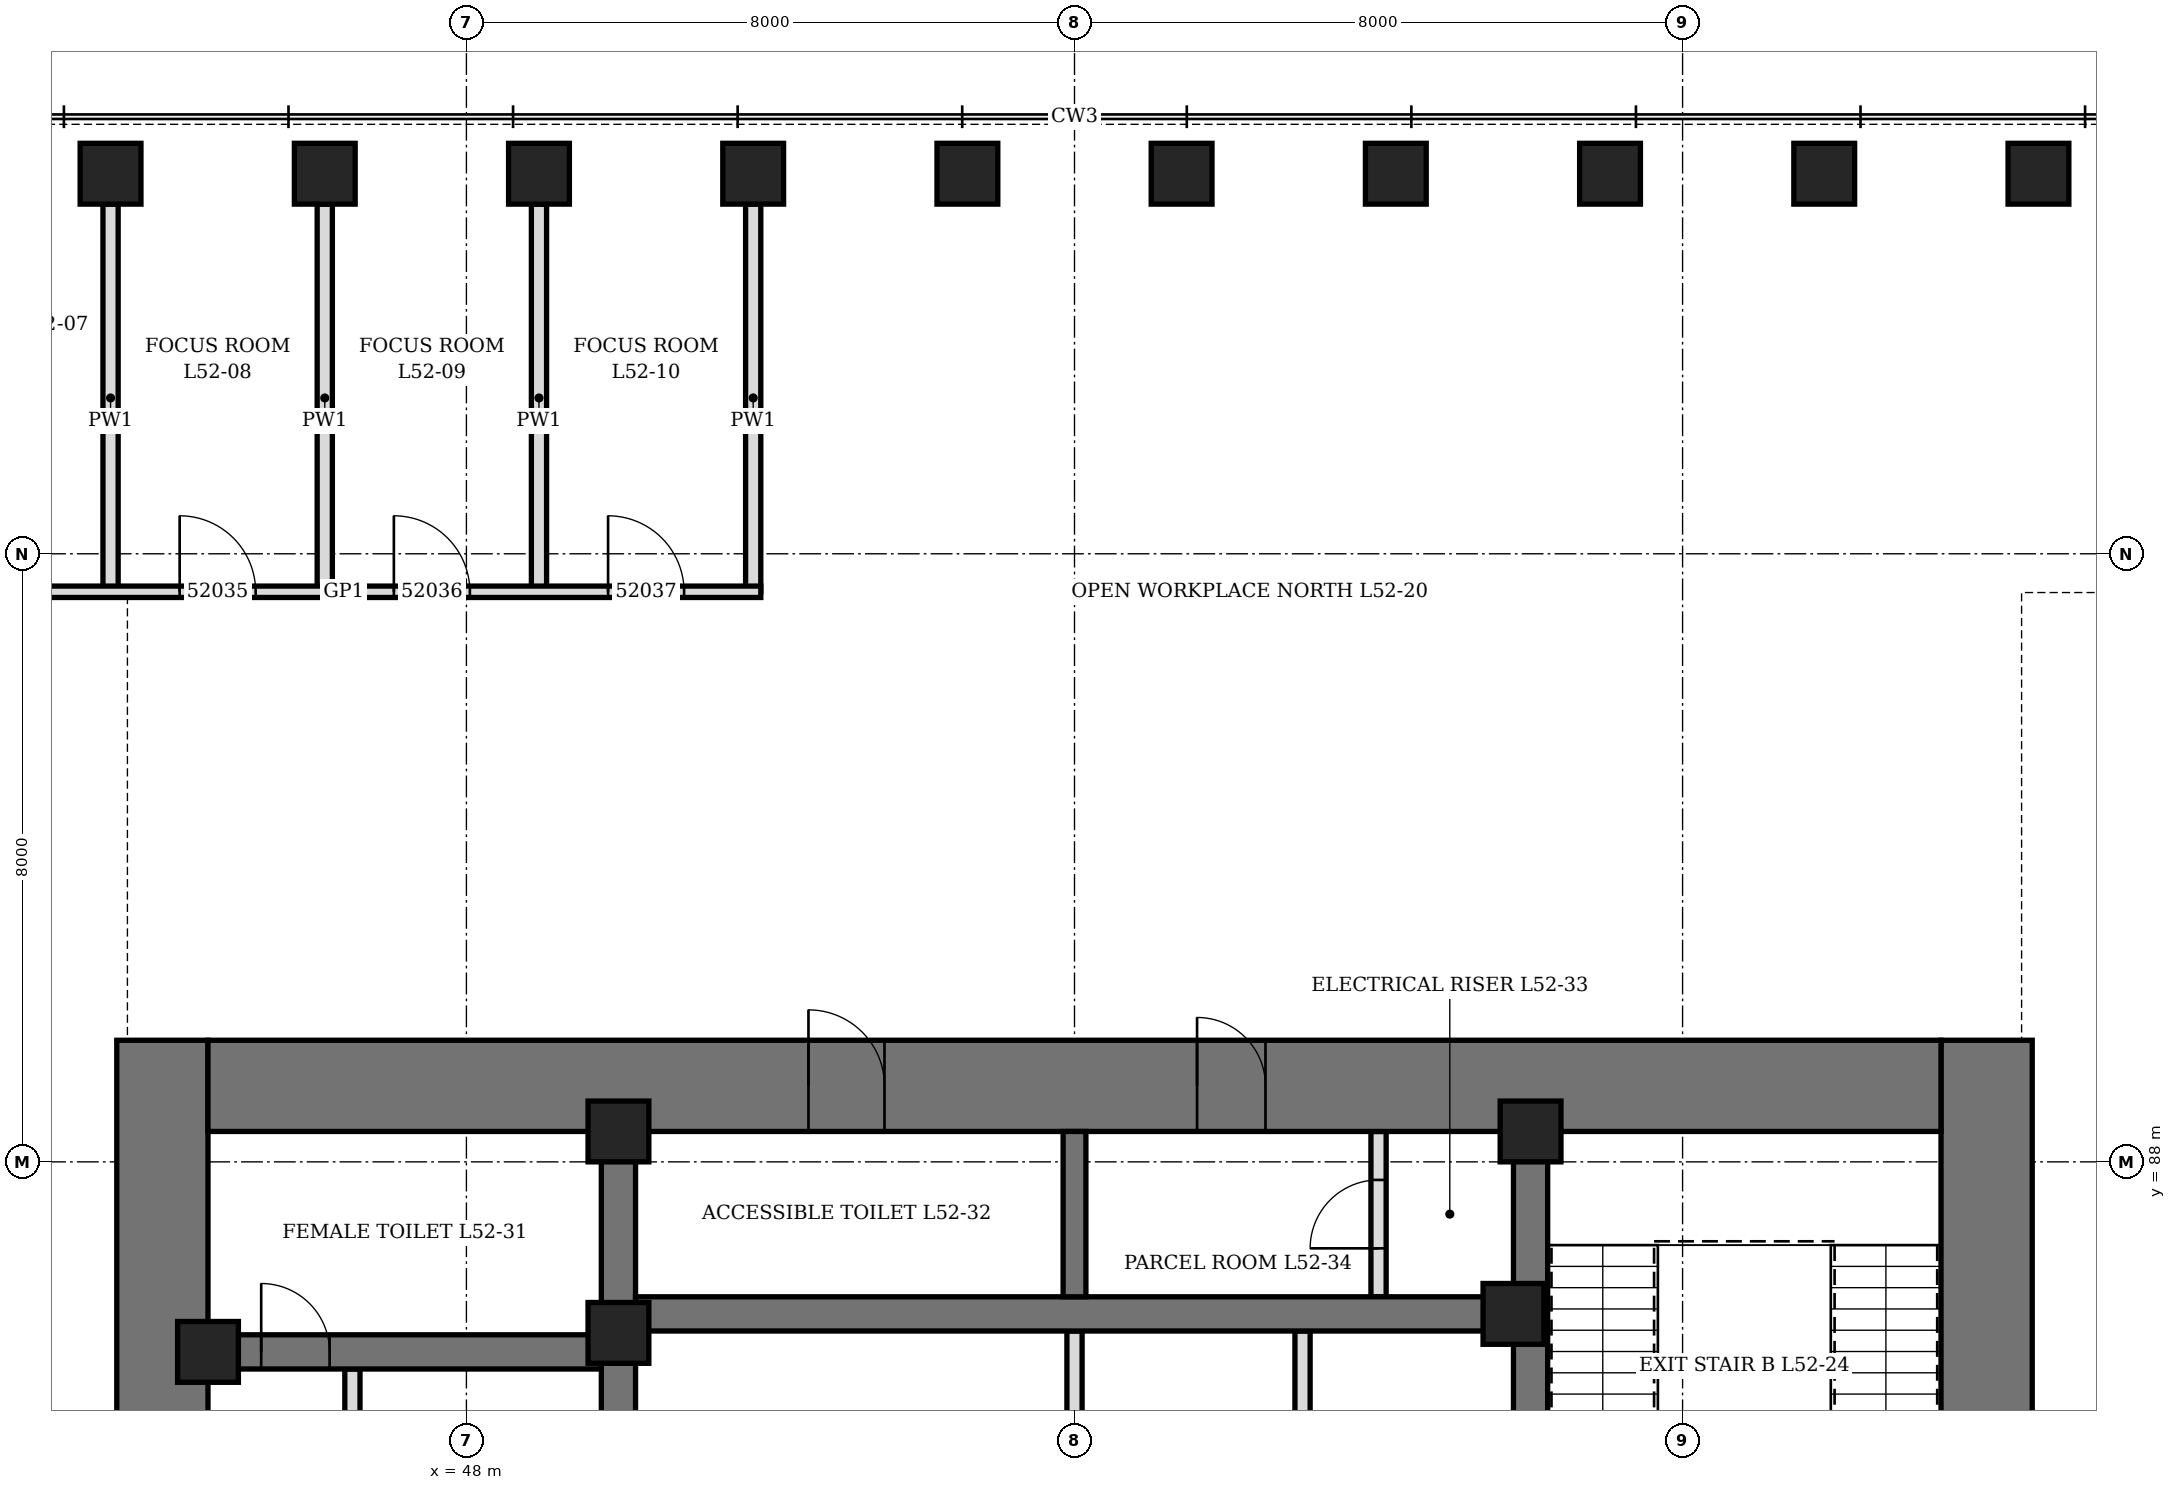
"""IFC4 building model, lengths in metres.
Left out: names, types, materials, properties, quantities, classifications, styles, units other than length and angle.
Written with IfcOpenShell. Run it as: python <this file> out.ifc"""

import sys

from ifc_helpers import new_model, si_unit, direction, frame, frame_2d, origin, origin_2d, place, context, subcontext, project, spatial, rectangle, hollow_rectangle, extrude, element, fill, save


model = new_model("IFC4")
c1 = context("Model", 3, precision=1e-05, world=origin(), true_north=direction((0.0, 1.0)))
c2 = subcontext(c1, "Body", "Model", "MODEL_VIEW")
j1 = project(units=[si_unit("LENGTHUNIT", "METRE"), si_unit("PLANEANGLEUNIT", "RADIAN")], contexts=[c1])
p1 = place(None, origin())
s1 = spatial("IfcSite", under=j1, at=p1, CompositionType="ELEMENT")
p2 = place(p1, origin())
s2 = spatial("IfcBuilding", under=s1, at=p2, CompositionType="ELEMENT")
p3 = place(p2, frame((0.0, 0.0, 231.7)))
s3 = spatial("IfcBuildingStorey", under=s2, at=p3, CompositionType="ELEMENT", Elevation=231.7)
for number, where, z_axis, x_axis in (
    (1, (68.682, 101.0, 0.0), (0.0, 0.0, 1.0), (1.0, 0.0, 0.0)),
    (2, (65.864, 101.0, 0.0), (0.0, 0.0, 1.0), (1.0, 0.0, 0.0)),
    (3, (63.045, 101.0, 0.0), (0.0, 0.0, 1.0), (1.0, 0.0, 0.0)),
    (4, (60.227, 101.0, 0.0), (0.0, 0.0, 1.0), (1.0, 0.0, 0.0)),
    (5, (57.409, 101.0, 0.0), (0.0, 0.0, 1.0), (1.0, 0.0, 0.0)),
    (6, (54.591, 101.0, 0.0), (0.0, 0.0, 1.0), (1.0, 0.0, 0.0)),
    (7, (51.773, 101.0, 0.0), (0.0, 0.0, 1.0), (1.0, 0.0, 0.0)),
    (8, (48.955, 101.0, 0.0), (0.0, 0.0, 1.0), (1.0, 0.0, 0.0)),
    (9, (46.136, 101.0, 0.0), (0.0, 0.0, 1.0), (1.0, 0.0, 0.0)),
    (10, (43.318, 101.0, 0.0), (0.0, 0.0, 1.0), (1.0, 0.0, 0.0)),
):
    element("IfcColumn", number, at=place(p3, frame(where, z_axis=z_axis, x_axis=x_axis)), inside=s3, PredefinedType="COLUMN", context=c2, shape_type="SweptSolid", body=[
        extrude(hollow_rectangle(XDim=0.8, YDim=0.8, WallThickness=0.08, at=origin_2d()), origin(), (0.0, 0.0, 1.0), 4.2),
    ])
p4 = place(p3, frame((44.0, 70.4, 0.0), z_axis=(0.0, 0.0, 1.0), x_axis=(0.0, 1.0, 0.0)))
e11 = element("IfcWall", 11, at=p4, inside=s3, PredefinedType="SHEAR", context=c2, shape_type="SweptSolid", body=[
    extrude(rectangle(XDim=19.2, YDim=1.2, at=frame_2d((9.6, 0.0))), origin(), (0.0, 0.0, 1.0), 4.2),
])
p5 = place(p4, frame((8.6, 0.0, 0.0)))
e12 = element("IfcOpeningElement", 12, at=p5, cuts=e11, PredefinedType="OPENING", context=c2, shape_type="SweptSolid", body=[
    extrude(rectangle(XDim=2.0, YDim=2.4, at=frame_2d((1.0, 1.2))), frame((0.0, 0.61, 0.0), z_axis=(0.0, -1.0, 0.0), x_axis=(1.0, 0.0, 0.0)), (0.0, 0.0, 1.0), 1.22),
])
p6 = place(p3, frame((68.0, 70.4, 0.0), z_axis=(0.0, 0.0, 1.0), x_axis=(0.0, 1.0, 0.0)))
e13 = element("IfcWall", 13, at=p6, inside=s3, PredefinedType="SHEAR", context=c2, shape_type="SweptSolid", body=[
    extrude(rectangle(XDim=19.2, YDim=1.2, at=frame_2d((9.6, 0.0))), origin(), (0.0, 0.0, 1.0), 4.2),
])
p7 = place(p6, frame((8.6, 0.0, 0.0)))
e14 = element("IfcOpeningElement", 14, at=p7, cuts=e13, PredefinedType="OPENING", context=c2, shape_type="SweptSolid", body=[
    extrude(rectangle(XDim=2.0, YDim=2.4, at=frame_2d((1.0, 1.2))), frame((0.0, 0.61, 0.0), z_axis=(0.0, -1.0, 0.0), x_axis=(1.0, 0.0, 0.0)), (0.0, 0.0, 1.0), 1.22),
])
p8 = place(p3, frame((44.6, 89.0, 0.0), z_axis=(0.0, 0.0, 1.0), x_axis=(1.0, 0.0, 0.0)))
e15 = element("IfcWall", 15, at=p8, inside=s3, PredefinedType="SHEAR", context=c2, shape_type="SweptSolid", body=[
    extrude(rectangle(XDim=22.8, YDim=1.2, at=frame_2d((11.4, 0.0))), origin(), (0.0, 0.0, 1.0), 4.2),
])
p9 = place(p8, frame((7.9, 0.0, 0.0)))
e16 = element("IfcOpeningElement", 16, at=p9, cuts=e15, PredefinedType="OPENING", context=c2, shape_type="SweptSolid", body=[
    extrude(rectangle(XDim=1.0, YDim=2.1, at=frame_2d((0.5, 1.05))), frame((0.0, 0.61, 0.0), z_axis=(0.0, -1.0, 0.0), x_axis=(1.0, 0.0, 0.0)), (0.0, 0.0, 1.0), 1.22),
])
p10 = place(p8, frame((13.012, 0.0, 0.0)))
e17 = element("IfcOpeningElement", 17, at=p10, cuts=e15, PredefinedType="OPENING", context=c2, shape_type="SweptSolid", body=[
    extrude(rectangle(XDim=0.9, YDim=2.1, at=frame_2d((0.45, 1.05))), frame((0.0, 0.61, 0.0), z_axis=(0.0, -1.0, 0.0), x_axis=(1.0, 0.0, 0.0)), (0.0, 0.0, 1.0), 1.22),
])
p11 = place(p3, frame((50.0, 71.6, 0.0), z_axis=(0.0, 0.0, 1.0), x_axis=(0.0, 1.0, 0.0)))
e18 = element("IfcWall", 18, at=p11, inside=s3, PredefinedType="SHEAR", context=c2, shape_type="SweptSolid", body=[
    extrude(rectangle(XDim=16.8, YDim=0.45, at=frame_2d((8.4, 0.0))), origin(), (0.0, 0.0, 1.0), 4.2),
])
p12 = place(p11, frame((7.5, 0.0, 0.0)))
e19 = element("IfcOpeningElement", 19, at=p12, cuts=e18, PredefinedType="OPENING", context=c2, shape_type="SweptSolid", body=[
    extrude(rectangle(XDim=1.8, YDim=2.4, at=frame_2d((0.9, 1.2))), frame((0.0, 0.235, 0.0), z_axis=(0.0, -1.0, 0.0), x_axis=(1.0, 0.0, 0.0)), (0.0, 0.0, 1.0), 0.47),
])
p13 = place(p3, frame((62.0, 71.6, 0.0), z_axis=(0.0, 0.0, 1.0), x_axis=(0.0, 1.0, 0.0)))
e20 = element("IfcWall", 20, at=p13, inside=s3, PredefinedType="SHEAR", context=c2, shape_type="SweptSolid", body=[
    extrude(rectangle(XDim=16.8, YDim=0.45, at=frame_2d((8.4, 0.0))), origin(), (0.0, 0.0, 1.0), 4.2),
])
p14 = place(p13, frame((7.5, 0.0, 0.0)))
e21 = element("IfcOpeningElement", 21, at=p14, cuts=e20, PredefinedType="OPENING", context=c2, shape_type="SweptSolid", body=[
    extrude(rectangle(XDim=1.8, YDim=2.4, at=frame_2d((0.9, 1.2))), frame((0.0, 0.235, 0.0), z_axis=(0.0, -1.0, 0.0), x_axis=(1.0, 0.0, 0.0)), (0.0, 0.0, 1.0), 0.47),
])
p15 = place(p3, frame((44.6, 85.5, 0.0), z_axis=(0.0, 0.0, 1.0), x_axis=(1.0, 0.0, 0.0)))
e22 = element("IfcWall", 22, at=p15, inside=s3, PredefinedType="SHEAR", context=c2, shape_type="SweptSolid", body=[
    extrude(rectangle(XDim=5.175, YDim=0.45, at=frame_2d((2.587, 0.0))), origin(), (0.0, 0.0, 1.0), 4.2),
])
p16 = place(p15, frame((0.7, 0.0, 0.0)))
e23 = element("IfcOpeningElement", 23, at=p16, cuts=e22, PredefinedType="OPENING", context=c2, shape_type="SweptSolid", body=[
    extrude(rectangle(XDim=0.9, YDim=2.1, at=frame_2d((0.45, 1.05))), frame((0.0, 0.235, 0.0), z_axis=(0.0, -1.0, 0.0), x_axis=(1.0, 0.0, 0.0)), (0.0, 0.0, 1.0), 0.47),
])
p17 = place(p3, frame((50.225, 86.0, 0.0), z_axis=(0.0, 0.0, 1.0), x_axis=(1.0, 0.0, 0.0)))
e24 = element("IfcWall", 24, at=p17, inside=s3, PredefinedType="SHEAR", context=c2, shape_type="SweptSolid", body=[
    extrude(rectangle(XDim=11.55, YDim=0.45, at=frame_2d((5.775, 0.0))), origin(), (0.0, 0.0, 1.0), 4.2),
])
p18 = place(p3, frame((56.0, 86.225, 0.0), z_axis=(0.0, 0.0, 1.0), x_axis=(0.0, 1.0, 0.0)))
e25 = element("IfcWall", 25, at=p18, inside=s3, PredefinedType="SHEAR", context=c2, shape_type="SweptSolid", body=[
    extrude(rectangle(XDim=2.175, YDim=0.3, at=frame_2d((1.087, 0.0))), origin(), (0.0, 0.0, 1.0), 4.2),
])
for number, where, z_axis, x_axis in (
    (26, (44.6, 85.5, 0.0), (0.0, 0.0, 1.0), (1.0, 0.0, 0.0)),
    (27, (50.0, 85.75, 0.0), (0.0, 0.0, 1.0), (1.0, 0.0, 0.0)),
    (28, (50.0, 88.4, 0.0), (0.0, 0.0, 1.0), (1.0, 0.0, 0.0)),
    (29, (61.775, 86.0, 0.0), (0.0, 0.0, 1.0), (1.0, 0.0, 0.0)),
    (30, (62.0, 88.4, 0.0), (0.0, 0.0, 1.0), (1.0, 0.0, 0.0)),
):
    element("IfcColumn", number, at=place(p3, frame(where, z_axis=z_axis, x_axis=x_axis)), inside=s3, PredefinedType="COLUMN", context=c2, shape_type="SweptSolid", body=[
        extrude(hollow_rectangle(XDim=0.8, YDim=0.8, WallThickness=0.1, at=origin_2d()), origin(), (0.0, 0.0, 1.0), 4.2),
    ])
p19 = place(p3, frame((46.5, 82.225, 0.0), z_axis=(0.0, 0.0, 1.0), x_axis=(0.0, 1.0, 0.0)))
e31 = element("IfcWall", 31, at=p19, inside=s3, PredefinedType="PARTITIONING", context=c2, shape_type="SweptSolid", body=[
    extrude(rectangle(XDim=3.05, YDim=0.2, at=frame_2d((1.525, 0.0))), origin(), (0.0, 0.0, 1.0), 4.04),
])
p20 = place(p19, frame((1.075, 0.0, 0.0)))
e32 = element("IfcOpeningElement", 32, at=p20, cuts=e31, PredefinedType="OPENING", context=c2, shape_type="SweptSolid", body=[
    extrude(rectangle(XDim=0.9, YDim=2.1, at=frame_2d((0.45, 1.05))), frame((0.0, 0.11, 0.0), z_axis=(0.0, -1.0, 0.0), x_axis=(1.0, 0.0, 0.0)), (0.0, 0.0, 1.0), 0.22),
])
p21 = place(p3, frame((60.0, 86.225, 0.0), z_axis=(0.0, 0.0, 1.0), x_axis=(0.0, 1.0, 0.0)))
e33 = element("IfcWall", 33, at=p21, inside=s3, PredefinedType="PARTITIONING", context=c2, shape_type="SweptSolid", body=[
    extrude(rectangle(XDim=2.175, YDim=0.2, at=frame_2d((1.087, 0.0))), origin(), (0.0, 0.0, 1.0), 4.04),
])
p22 = place(p21, frame((0.637, 0.0, 0.0)))
e34 = element("IfcOpeningElement", 34, at=p22, cuts=e33, PredefinedType="OPENING", context=c2, shape_type="SweptSolid", body=[
    extrude(rectangle(XDim=0.9, YDim=2.1, at=frame_2d((0.45, 1.05))), frame((0.0, 0.11, 0.0), z_axis=(0.0, -1.0, 0.0), x_axis=(1.0, 0.0, 0.0)), (0.0, 0.0, 1.0), 0.22),
])
p23 = place(p3, frame((56.0, 82.225, 0.0), z_axis=(0.0, 0.0, 1.0), x_axis=(0.0, 1.0, 0.0)))
e35 = element("IfcWall", 35, at=p23, inside=s3, PredefinedType="PARTITIONING", context=c2, shape_type="SweptSolid", body=[
    extrude(rectangle(XDim=3.55, YDim=0.2, at=frame_2d((1.775, 0.0))), origin(), (0.0, 0.0, 1.0), 3.14),
])
p24 = place(p3, frame((59.0, 82.225, 0.0), z_axis=(0.0, 0.0, 1.0), x_axis=(0.0, 1.0, 0.0)))
e36 = element("IfcWall", 36, at=p24, inside=s3, PredefinedType="PARTITIONING", context=c2, shape_type="SweptSolid", body=[
    extrude(rectangle(XDim=3.55, YDim=0.2, at=frame_2d((1.775, 0.0))), origin(), (0.0, 0.0, 1.0), 4.04),
])
for number, where, z_axis, x_axis in (
    (37, (43.318, 95.5, 0.0), (0.0, 0.0, 1.0), (0.0, 1.0, 0.0)),
    (38, (46.136, 95.5, 0.0), (0.0, 0.0, 1.0), (0.0, 1.0, 0.0)),
    (39, (48.955, 95.5, 0.0), (0.0, 0.0, 1.0), (0.0, 1.0, 0.0)),
    (40, (51.773, 95.5, 0.0), (0.0, 0.0, 1.0), (0.0, 1.0, 0.0)),
):
    element("IfcWall", number, at=place(p3, frame(where, z_axis=z_axis, x_axis=x_axis)), inside=s3, PredefinedType="PARTITIONING", context=c2, shape_type="SweptSolid", body=[
        extrude(rectangle(XDim=5.1, YDim=0.2, at=frame_2d((2.55, 0.0))), origin(), (0.0, 0.0, 1.0), 3.428),
    ])
p25 = place(p3, frame((40.9, 95.5, 0.0), z_axis=(0.0, 0.0, 1.0), x_axis=(1.0, 0.0, 0.0)))
e41 = element("IfcWall", 41, at=p25, inside=s3, PredefinedType="PARTITIONING", context=c2, shape_type="SweptSolid", body=[
    extrude(rectangle(XDim=10.973, YDim=0.15, at=frame_2d((5.486, 0.0))), origin(), (0.0, 0.0, 1.0), 4.04),
])
p26 = place(p25, frame((0.509, 0.0, 0.0)))
e42 = element("IfcOpeningElement", 42, at=p26, cuts=e41, PredefinedType="OPENING", context=c2, shape_type="SweptSolid", body=[
    extrude(rectangle(XDim=1.0, YDim=2.4, at=frame_2d((0.5, 1.2))), frame((0.0, 0.085, 0.0), z_axis=(0.0, -1.0, 0.0), x_axis=(1.0, 0.0, 0.0)), (0.0, 0.0, 1.0), 0.17),
])
p27 = place(p25, frame((3.327, 0.0, 0.0)))
e43 = element("IfcOpeningElement", 43, at=p27, cuts=e41, PredefinedType="OPENING", context=c2, shape_type="SweptSolid", body=[
    extrude(rectangle(XDim=1.0, YDim=2.4, at=frame_2d((0.5, 1.2))), frame((0.0, 0.085, 0.0), z_axis=(0.0, -1.0, 0.0), x_axis=(1.0, 0.0, 0.0)), (0.0, 0.0, 1.0), 0.17),
])
p28 = place(p25, frame((6.146, 0.0, 0.0)))
e44 = element("IfcOpeningElement", 44, at=p28, cuts=e41, PredefinedType="OPENING", context=c2, shape_type="SweptSolid", body=[
    extrude(rectangle(XDim=1.0, YDim=2.4, at=frame_2d((0.5, 1.2))), frame((0.0, 0.085, 0.0), z_axis=(0.0, -1.0, 0.0), x_axis=(1.0, 0.0, 0.0)), (0.0, 0.0, 1.0), 0.17),
])
p29 = place(p25, frame((8.964, 0.0, 0.0)))
e45 = element("IfcOpeningElement", 45, at=p29, cuts=e41, PredefinedType="OPENING", context=c2, shape_type="SweptSolid", body=[
    extrude(rectangle(XDim=1.0, YDim=2.4, at=frame_2d((0.5, 1.2))), frame((0.0, 0.085, 0.0), z_axis=(0.0, -1.0, 0.0), x_axis=(1.0, 0.0, 0.0)), (0.0, 0.0, 1.0), 0.17),
])
p30 = place(p16, origin())
e46 = element("IfcDoor", 46, at=p30, inside=s3, OperationType="SINGLE_SWING_RIGHT", PredefinedType="DOOR", context=c2, shape_type="SweptSolid", body=[
    extrude(rectangle(XDim=0.9, YDim=2.1, at=frame_2d((0.45, 1.05))), frame((0.0, 0.225, 0.0), z_axis=(0.0, -1.0, 0.0), x_axis=(1.0, 0.0, 0.0)), (0.0, 0.0, 1.0), 0.449),
])
fill(e23, e46)
p31 = place(p9, origin())
e47 = element("IfcDoor", 47, at=p31, inside=s3, OperationType="SINGLE_SWING_LEFT", PredefinedType="DOOR", context=c2, shape_type="SweptSolid", body=[
    extrude(rectangle(XDim=1.0, YDim=2.1, at=frame_2d((0.5, 1.05))), frame((0.0, 0.35, 0.0), z_axis=(0.0, -1.0, 0.0), x_axis=(1.0, 0.0, 0.0)), (0.0, 0.0, 1.0), 0.7),
])
fill(e16, e47)
p32 = place(p10, origin())
e48 = element("IfcDoor", 48, at=p32, inside=s3, OperationType="SINGLE_SWING_LEFT", PredefinedType="DOOR", context=c2, shape_type="SweptSolid", body=[
    extrude(rectangle(XDim=0.9, YDim=2.1, at=frame_2d((0.45, 1.05))), frame((0.0, 0.35, 0.0), z_axis=(0.0, -1.0, 0.0), x_axis=(1.0, 0.0, 0.0)), (0.0, 0.0, 1.0), 0.7),
])
fill(e17, e48)
p33 = place(p22, origin())
e49 = element("IfcDoor", 49, at=p33, inside=s3, OperationType="SINGLE_SWING_LEFT", PredefinedType="DOOR", context=c2, shape_type="SweptSolid", body=[
    extrude(rectangle(XDim=0.9, YDim=2.1, at=frame_2d((0.45, 1.05))), frame((0.0, 0.1, 0.0), z_axis=(0.0, -1.0, 0.0), x_axis=(1.0, 0.0, 0.0)), (0.0, 0.0, 1.0), 0.199),
])
fill(e34, e49)
p34 = place(p27, origin())
e50 = element("IfcDoor", 50, at=p34, inside=s3, OperationType="SINGLE_SWING_RIGHT", PredefinedType="DOOR", context=c2, shape_type="SweptSolid", body=[
    extrude(rectangle(XDim=1.0, YDim=2.4, at=frame_2d((0.5, 1.2))), frame((0.0, 0.075, 0.0), z_axis=(0.0, -1.0, 0.0), x_axis=(1.0, 0.0, 0.0)), (0.0, 0.0, 1.0), 0.149),
])
fill(e43, e50)
p35 = place(p28, origin())
e51 = element("IfcDoor", 51, at=p35, inside=s3, OperationType="SINGLE_SWING_RIGHT", PredefinedType="DOOR", context=c2, shape_type="SweptSolid", body=[
    extrude(rectangle(XDim=1.0, YDim=2.4, at=frame_2d((0.5, 1.2))), frame((0.0, 0.075, 0.0), z_axis=(0.0, -1.0, 0.0), x_axis=(1.0, 0.0, 0.0)), (0.0, 0.0, 1.0), 0.149),
])
fill(e44, e51)
p36 = place(p29, origin())
e52 = element("IfcDoor", 52, at=p36, inside=s3, OperationType="SINGLE_SWING_RIGHT", PredefinedType="DOOR", context=c2, shape_type="SweptSolid", body=[
    extrude(rectangle(XDim=1.0, YDim=2.4, at=frame_2d((0.5, 1.2))), frame((0.0, 0.075, 0.0), z_axis=(0.0, -1.0, 0.0), x_axis=(1.0, 0.0, 0.0)), (0.0, 0.0, 1.0), 0.149),
])
fill(e45, e52)
save(model, sys.argv[1])
